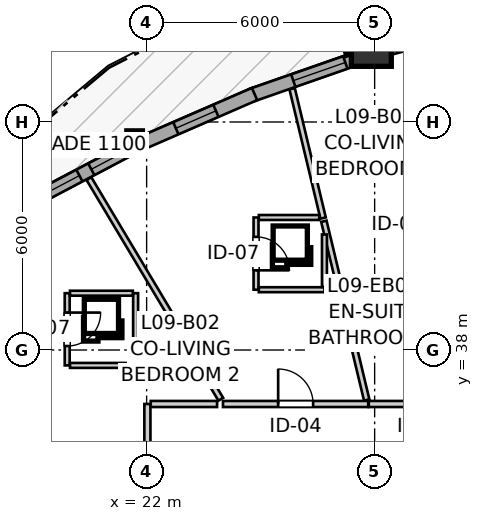
"""IFC4 building model, lengths in metres.
Left out: names, types, materials, properties, quantities, classifications, styles, units other than length and angle.
Written with IfcOpenShell. Run it as: python <this file> out.ifc"""

import sys

from ifc_helpers import new_model, si_unit, direction, frame, frame_2d, origin, origin_2d, place, context, subcontext, project, spatial, rectangle, i_section, extrude, source, transform, mapped, element, fill, save


model = new_model("IFC4")
c1 = context("Model", 3, precision=1e-05, world=origin(), true_north=direction((0.0, 1.0)))
c2 = subcontext(c1, "Body", "Model", "MODEL_VIEW")
j1 = project(units=[si_unit("LENGTHUNIT", "METRE"), si_unit("PLANEANGLEUNIT", "RADIAN")], contexts=[c1])
p1 = place(None, origin())
s1 = spatial("IfcSite", under=j1, at=p1, CompositionType="ELEMENT")
p2 = place(p1, origin())
s2 = spatial("IfcBuilding", under=s1, at=p2, CompositionType="ELEMENT")
p3 = place(p2, frame((0.0, 0.0, 33.4)))
s3 = spatial("IfcBuildingStorey", under=s2, at=p3, CompositionType="ELEMENT", Elevation=33.4)
m1 = source(origin(), c2, "Body", "SweptSolid", [
    extrude(rectangle(XDim=1.05, YDim=1.05, at=origin_2d()), origin(), (0.0, 0.0, 1.0), 2.94),
])
p4 = place(p3, frame((27.913, 45.99, 0.0), z_axis=(0.0, 0.0, 1.0), x_axis=(1.0, 0.0, 0.0)))
e1 = element("IfcColumn", 1, at=p4, inside=s3, PredefinedType="COLUMN", context=c2, shape_type="MappedRepresentation", body=[
    mapped(m1, transform((0.0, 0.0, 0.0), x_axis=(1.0, 0.0, 0.0), y_axis=(0.0, 1.0, 0.0), z_axis=(0.0, 0.0, 1.0), scale=1.0)),
])
m2 = source(origin(), c2, "Body", "SweptSolid", [
    extrude(i_section(OverallWidth=0.409, OverallDepth=0.425, WebThickness=0.03, FlangeThickness=0.048, FilletRadius=0.015, at=origin_2d()), origin(), (0.0, 0.0, 1.0), 2.94),
])
p5 = place(p3, frame((21.683, 43.554, 0.0), z_axis=(0.0, 0.0, 1.0), x_axis=(1.0, 0.0, 0.0)))
e2 = element("IfcColumn", 2, at=p5, inside=s3, PredefinedType="PILASTER", context=c2, shape_type="MappedRepresentation", body=[
    mapped(m2, transform((0.0, 0.0, 0.0), x_axis=(1.0, 0.0, 0.0), y_axis=(0.0, 1.0, 0.0), z_axis=(0.0, 0.0, 1.0), scale=1.0)),
])
p6 = place(p3, frame((31.298, 46.722, 0.0), z_axis=(0.0, 0.0, 1.0), x_axis=(-0.965455913242, -0.260566459057, 0.0)))
e3 = element("IfcWall", 3, at=p6, inside=s3, PredefinedType="SOLIDWALL", context=c2, shape_type="SweptSolid", body=[
    extrude(rectangle(XDim=3.159, YDim=0.35, at=frame_2d((1.58, 0.0))), origin(), (0.0, 0.0, 1.0), 2.42),
])
p7 = place(p6, frame((1.08, 0.0, 0.0)))
e4 = element("IfcOpeningElement", 4, at=p7, cuts=e3, PredefinedType="OPENING", context=c2, shape_type="SweptSolid", body=[
    extrude(rectangle(XDim=1.0, YDim=2.1, at=frame_2d((0.5, 1.05))), frame((0.0, 0.185, 0.0), z_axis=(0.0, -1.0, 0.0), x_axis=(1.0, 0.0, 0.0)), (0.0, 0.0, 1.0), 0.37),
])
p8 = place(p3, frame((27.687, 45.726, 0.0), z_axis=(0.0, 0.0, 1.0), x_axis=(-0.9441205041, -0.329600475936, 0.0)))
e5 = element("IfcWall", 5, at=p8, inside=s3, PredefinedType="SOLIDWALL", context=c2, shape_type="SweptSolid", body=[
    extrude(rectangle(XDim=3.104, YDim=0.35, at=frame_2d((1.552, 0.0))), origin(), (0.0, 0.0, 1.0), 2.42),
])
p9 = place(p8, frame((0.486, 0.0, 0.82)))
e6 = element("IfcOpeningElement", 6, at=p9, cuts=e5, PredefinedType="OPENING", context=c2, shape_type="SweptSolid", body=[
    extrude(rectangle(XDim=1.45, YDim=1.25, at=frame_2d((0.725, 0.625))), frame((0.0, 0.185, 0.0), z_axis=(0.0, -1.0, 0.0), x_axis=(1.0, 0.0, 0.0)), (0.0, 0.0, 1.0), 0.37),
])
p10 = place(p3, frame((24.84, 44.735, 0.0), z_axis=(0.0, 0.0, 1.0), x_axis=(-0.917090935142, -0.398678086532, 0.0)))
e7 = element("IfcWall", 7, at=p10, inside=s3, PredefinedType="SOLIDWALL", context=c2, shape_type="SweptSolid", body=[
    extrude(rectangle(XDim=3.346, YDim=0.35, at=frame_2d((1.673, 0.0))), origin(), (0.0, 0.0, 1.0), 2.42),
])
p11 = place(p10, frame((1.108, 0.0, 0.82)))
e8 = element("IfcOpeningElement", 8, at=p11, cuts=e7, PredefinedType="OPENING", context=c2, shape_type="SweptSolid", body=[
    extrude(rectangle(XDim=1.15, YDim=1.2, at=frame_2d((0.575, 0.6))), frame((0.0, 0.185, 0.0), z_axis=(0.0, -1.0, 0.0), x_axis=(1.0, 0.0, 0.0)), (0.0, 0.0, 1.0), 0.37),
])
p12 = place(p3, frame((21.747, 43.39, 0.0), z_axis=(0.0, 0.0, 1.0), x_axis=(-0.88437802144, -0.46677137358, 0.0)))
e9 = element("IfcWall", 9, at=p12, inside=s3, PredefinedType="SOLIDWALL", context=c2, shape_type="SweptSolid", body=[
    extrude(rectangle(XDim=3.327, YDim=0.35, at=frame_2d((1.664, 0.0))), origin(), (0.0, 0.0, 1.0), 2.42),
])
p13 = place(p12, frame((0.311, 0.0, 0.82)))
e10 = element("IfcOpeningElement", 10, at=p13, cuts=e9, PredefinedType="OPENING", context=c2, shape_type="SweptSolid", body=[
    extrude(rectangle(XDim=1.05, YDim=1.45, at=frame_2d((0.525, 0.725))), frame((0.0, 0.185, 0.0), z_axis=(0.0, -1.0, 0.0), x_axis=(1.0, 0.0, 0.0)), (0.0, 0.0, 1.0), 0.37),
])
p14 = place(p12, frame((1.714, 0.0, 0.82)))
e11 = element("IfcOpeningElement", 11, at=p14, cuts=e9, PredefinedType="OPENING", context=c2, shape_type="SweptSolid", body=[
    extrude(rectangle(XDim=1.35, YDim=1.45, at=frame_2d((0.675, 0.725))), frame((0.0, 0.185, 0.0), z_axis=(0.0, -1.0, 0.0), x_axis=(1.0, 0.0, 0.0)), (0.0, 0.0, 1.0), 0.37),
])
p15 = place(p3, frame((22.02, 32.71, 0.0), z_axis=(0.0, 0.0, 1.0), x_axis=(0.0, 1.0, 0.0)))
e12 = element("IfcWall", 12, at=p15, inside=s3, PredefinedType="PARTITIONING", context=c2, shape_type="SweptSolid", body=[
    extrude(rectangle(XDim=3.87, YDim=0.16, at=frame_2d((1.935, 0.0))), origin(), (0.0, 0.0, 1.0), 2.94),
])
p16 = place(p15, frame((1.485, 0.0, 0.0)))
e13 = element("IfcOpeningElement", 13, at=p16, cuts=e12, PredefinedType="OPENING", context=c2, shape_type="SweptSolid", body=[
    extrude(rectangle(XDim=0.92, YDim=2.1, at=frame_2d((0.46, 1.05))), frame((0.0, 0.09, 0.0), z_axis=(0.0, -1.0, 0.0), x_axis=(1.0, 0.0, 0.0)), (0.0, 0.0, 1.0), 0.18),
])
p17 = place(p3, frame((24.009, 36.58, 0.0), z_axis=(0.0, 0.0, 1.0), x_axis=(1.0, 0.0, 0.0)))
e14 = element("IfcWall", 14, at=p17, inside=s3, PredefinedType="PARTITIONING", context=c2, shape_type="SweptSolid", body=[
    extrude(rectangle(XDim=3.822, YDim=0.16, at=frame_2d((1.911, 0.0))), origin(), (0.0, 0.0, 1.0), 2.548),
])
p18 = place(p17, frame((1.452, 0.0, 0.0)))
e15 = element("IfcOpeningElement", 15, at=p18, cuts=e14, PredefinedType="OPENING", context=c2, shape_type="SweptSolid", body=[
    extrude(rectangle(XDim=0.92, YDim=2.1, at=frame_2d((0.46, 1.05))), frame((0.0, 0.09, 0.0), z_axis=(0.0, -1.0, 0.0), x_axis=(1.0, 0.0, 0.0)), (0.0, 0.0, 1.0), 0.18),
])
p19 = place(p3, frame((27.846, 36.58, 0.0), z_axis=(0.0, 0.0, 1.0), x_axis=(1.0, 0.0, 0.0)))
e16 = element("IfcWall", 16, at=p19, inside=s3, PredefinedType="PARTITIONING", context=c2, shape_type="SweptSolid", body=[
    extrude(rectangle(XDim=2.903, YDim=0.16, at=frame_2d((1.452, 0.0))), origin(), (0.0, 0.0, 1.0), 2.94),
])
p20 = place(p19, frame((0.969, 0.0, 0.0)))
e17 = element("IfcOpeningElement", 17, at=p20, cuts=e16, PredefinedType="OPENING", context=c2, shape_type="SweptSolid", body=[
    extrude(rectangle(XDim=0.92, YDim=2.1, at=frame_2d((0.46, 1.05))), frame((0.0, 0.09, 0.0), z_axis=(0.0, -1.0, 0.0), x_axis=(1.0, 0.0, 0.0)), (0.0, 0.0, 1.0), 0.18),
])
p21 = place(p3, frame((24.879, 41.487, 0.0), z_axis=(0.0, 0.0, 1.0), x_axis=(0.0, -1.0, 0.0)))
e18 = element("IfcWall", 18, at=p21, inside=s3, PredefinedType="PARTITIONING", context=c2, shape_type="SweptSolid", body=[
    extrude(rectangle(XDim=1.9, YDim=0.13, at=frame_2d((0.95, 0.0))), origin(), (0.0, 0.0, 1.0), 2.94),
])
p22 = place(p21, frame((0.51, 0.0, 0.0)))
e19 = element("IfcOpeningElement", 19, at=p22, cuts=e18, PredefinedType="OPENING", context=c2, shape_type="SweptSolid", body=[
    extrude(rectangle(XDim=0.88, YDim=2.05, at=frame_2d((0.44, 1.025))), frame((0.0, 0.075, 0.0), z_axis=(0.0, -1.0, 0.0), x_axis=(1.0, 0.0, 0.0)), (0.0, 0.0, 1.0), 0.15),
])
p23 = place(p3, frame((19.91, 39.495, 0.0), z_axis=(0.0, 0.0, 1.0), x_axis=(0.0, -1.0, 0.0)))
e20 = element("IfcWall", 20, at=p23, inside=s3, PredefinedType="PARTITIONING", context=c2, shape_type="SweptSolid", body=[
    extrude(rectangle(XDim=1.9, YDim=0.13, at=frame_2d((0.95, 0.0))), origin(), (0.0, 0.0, 1.0), 2.94),
])
p24 = place(p23, frame((0.51, 0.0, 0.0)))
e21 = element("IfcOpeningElement", 21, at=p24, cuts=e20, PredefinedType="OPENING", context=c2, shape_type="SweptSolid", body=[
    extrude(rectangle(XDim=0.88, YDim=2.05, at=frame_2d((0.44, 1.025))), frame((0.0, 0.075, 0.0), z_axis=(0.0, -1.0, 0.0), x_axis=(1.0, 0.0, 0.0)), (0.0, 0.0, 1.0), 0.15),
])
p25 = place(p3, frame((11.92, 36.618, 0.0), z_axis=(0.0, 0.0, 1.0), x_axis=(0.866473494239, -0.499223080177, 0.0)))
e22 = element("IfcWall", 22, at=p25, inside=s3, PredefinedType="PARTITIONING", context=c2, shape_type="SweptSolid", body=[
    extrude(rectangle(XDim=11.514, YDim=0.145, at=frame_2d((5.757, 0.0))), origin(), (0.0, 0.0, 1.0), 2.94),
])
p26 = place(p3, frame((14.566, 38.751, 0.0), z_axis=(0.0, 0.0, 1.0), x_axis=(0.777881688073, -0.628410756879, 0.0)))
e23 = element("IfcWall", 23, at=p26, inside=s3, PredefinedType="PARTITIONING", context=c2, shape_type="SweptSolid", body=[
    extrude(rectangle(XDim=9.413, YDim=0.145, at=frame_2d((4.707, 0.0))), origin(), (0.0, 0.0, 1.0), 2.94),
])
p27 = place(p3, frame((20.481, 42.51, 0.0), z_axis=(0.0, 0.0, 1.0), x_axis=(0.513067331262, -0.858348363773, 0.0)))
e24 = element("IfcWall", 24, at=p27, inside=s3, PredefinedType="PARTITIONING", context=c2, shape_type="SweptSolid", body=[
    extrude(rectangle(XDim=6.765, YDim=0.145, at=frame_2d((3.382, 0.0))), origin(), (0.0, 0.0, 1.0), 2.94),
])
p28 = place(p3, frame((26.664, 41.388, 0.0), z_axis=(0.0, 0.0, 1.0), x_axis=(0.233021630241, -0.972471552201, 0.0)))
e25 = element("IfcWall", 25, at=p28, inside=s3, PredefinedType="PARTITIONING", context=c2, shape_type="SweptSolid", body=[
    extrude(rectangle(XDim=4.836, YDim=0.145, at=frame_2d((2.418, 0.0))), origin(), (0.0, 0.0, 1.0), 2.94),
])
p29 = place(p3, frame((25.829, 44.875, 0.0), z_axis=(0.0, 0.0, 1.0), x_axis=(0.232921769711, -0.972495475154, 0.0)))
e26 = element("IfcWall", 26, at=p29, inside=s3, PredefinedType="PARTITIONING", context=c2, shape_type="SweptSolid", body=[
    extrude(rectangle(XDim=3.5, YDim=0.145, at=frame_2d((1.75, 0.0))), origin(), (0.0, 0.0, 1.0), 2.94),
])
p30 = place(p3, frame((22.108, 36.58, 0.0), z_axis=(0.0, 0.0, 1.0), x_axis=(1.0, 0.0, 0.0)))
e27 = element("IfcWall", 27, at=p30, inside=s3, PredefinedType="PARTITIONING", context=c2, shape_type="SweptSolid", body=[
    extrude(rectangle(XDim=1.746, YDim=0.16, at=frame_2d((0.873, 0.0))), origin(), (0.0, 0.0, 1.0), 2.548),
])
p31 = place(p3, frame((21.71, 37.595, 0.0), z_axis=(0.0, 0.0, 1.0), x_axis=(0.0, 1.0, 0.0)))
e28 = element("IfcWall", 28, at=p31, inside=s3, PredefinedType="PARTITIONING", context=c2, shape_type="SweptSolid", body=[
    extrude(rectangle(XDim=1.9, YDim=0.13, at=frame_2d((0.95, 0.0))), origin(), (0.0, 0.0, 1.0), 2.94),
])
for number, where, z_axis, x_axis in (
    (29, (19.983, 39.495, 0.0), (0.0, 0.0, 1.0), (1.0, 0.0, 0.0)),
    (30, (19.983, 37.595, 0.0), (0.0, 0.0, 1.0), (1.0, 0.0, 0.0)),
):
    element("IfcWall", number, at=place(p3, frame(where, z_axis=z_axis, x_axis=x_axis)), inside=s3, PredefinedType="PARTITIONING", context=c2, shape_type="SweptSolid", body=[
        extrude(rectangle(XDim=1.654, YDim=0.13, at=frame_2d((0.827, 0.0))), origin(), (0.0, 0.0, 1.0), 2.94),
    ])
p32 = place(p3, frame((24.952, 39.587, 0.0), z_axis=(0.0, 0.0, 1.0), x_axis=(1.0, 0.0, 0.0)))
e31 = element("IfcWall", 31, at=p32, inside=s3, PredefinedType="PARTITIONING", context=c2, shape_type="SweptSolid", body=[
    extrude(rectangle(XDim=1.727, YDim=0.13, at=frame_2d((0.864, 0.0))), origin(), (0.0, 0.0, 1.0), 2.94),
])
p33 = place(p3, frame((24.952, 41.487, 0.0), z_axis=(0.0, 0.0, 1.0), x_axis=(1.0, 0.0, 0.0)))
e32 = element("IfcWall", 32, at=p33, inside=s3, PredefinedType="PARTITIONING", context=c2, shape_type="SweptSolid", body=[
    extrude(rectangle(XDim=1.59, YDim=0.13, at=frame_2d((0.795, 0.0))), origin(), (0.0, 0.0, 1.0), 2.508),
])
p34 = place(p3, frame((26.679, 39.66, 0.0), z_axis=(0.0, 0.0, 1.0), x_axis=(0.0, 1.0, 0.0)))
e33 = element("IfcWall", 33, at=p34, inside=s3, PredefinedType="PARTITIONING", context=c2, shape_type="SweptSolid", body=[
    extrude(rectangle(XDim=1.38, YDim=0.13, at=frame_2d((0.69, 0.0))), origin(), (0.0, 0.0, 1.0), 2.94),
])
m3 = source(origin(), c2, "Body", "SweptSolid", [
    extrude(rectangle(XDim=1.45, YDim=1.25, at=frame_2d((0.725, 0.625))), frame((0.0, 0.03, 0.0), z_axis=(0.0, -1.0, 0.0), x_axis=(1.0, 0.0, 0.0)), (0.0, 0.0, 1.0), 0.06),
])
p35 = place(p9, origin())
e34 = element("IfcWindow", 34, at=p35, inside=s3, PartitioningType="SINGLE_PANEL", PredefinedType="WINDOW", context=c2, shape_type="MappedRepresentation", body=[
    mapped(m3, transform((0.0, 0.0, 0.0), x_axis=(1.0, 0.0, 0.0), y_axis=(0.0, 1.0, 0.0), z_axis=(0.0, 0.0, 1.0), scale=1.0)),
])
fill(e6, e34)
m4 = source(origin(), c2, "Body", "SweptSolid", [
    extrude(rectangle(XDim=1.15, YDim=1.2, at=frame_2d((0.575, 0.6))), frame((0.0, 0.03, 0.0), z_axis=(0.0, -1.0, 0.0), x_axis=(1.0, 0.0, 0.0)), (0.0, 0.0, 1.0), 0.06),
])
p36 = place(p11, origin())
e35 = element("IfcWindow", 35, at=p36, inside=s3, PartitioningType="SINGLE_PANEL", PredefinedType="WINDOW", context=c2, shape_type="MappedRepresentation", body=[
    mapped(m4, transform((0.0, 0.0, 0.0), x_axis=(1.0, 0.0, 0.0), y_axis=(0.0, 1.0, 0.0), z_axis=(0.0, 0.0, 1.0), scale=1.0)),
])
fill(e8, e35)
m5 = source(origin(), c2, "Body", "SweptSolid", [
    extrude(rectangle(XDim=1.05, YDim=1.45, at=frame_2d((0.525, 0.725))), frame((0.0, 0.03, 0.0), z_axis=(0.0, -1.0, 0.0), x_axis=(1.0, 0.0, 0.0)), (0.0, 0.0, 1.0), 0.06),
])
p37 = place(p13, origin())
e36 = element("IfcWindow", 36, at=p37, inside=s3, PartitioningType="SINGLE_PANEL", PredefinedType="WINDOW", context=c2, shape_type="MappedRepresentation", body=[
    mapped(m5, transform((0.0, 0.0, 0.0), x_axis=(1.0, 0.0, 0.0), y_axis=(0.0, 1.0, 0.0), z_axis=(0.0, 0.0, 1.0), scale=1.0)),
])
fill(e10, e36)
m6 = source(origin(), c2, "Body", "SweptSolid", [
    extrude(rectangle(XDim=1.35, YDim=1.45, at=frame_2d((0.675, 0.725))), frame((0.0, 0.03, 0.0), z_axis=(0.0, -1.0, 0.0), x_axis=(1.0, 0.0, 0.0)), (0.0, 0.0, 1.0), 0.06),
])
p38 = place(p14, origin())
e37 = element("IfcWindow", 37, at=p38, inside=s3, PartitioningType="SINGLE_PANEL", PredefinedType="WINDOW", context=c2, shape_type="MappedRepresentation", body=[
    mapped(m6, transform((0.0, 0.0, 0.0), x_axis=(1.0, 0.0, 0.0), y_axis=(0.0, 1.0, 0.0), z_axis=(0.0, 0.0, 1.0), scale=1.0)),
])
fill(e11, e37)
m7 = source(origin(), c2, "Body", "SweptSolid", [
    extrude(rectangle(XDim=0.92, YDim=2.1, at=frame_2d((0.46, 1.05))), frame((0.0, 0.025, 0.0), z_axis=(0.0, -1.0, 0.0), x_axis=(1.0, 0.0, 0.0)), (0.0, 0.0, 1.0), 0.05),
])
p39 = place(p18, origin())
e38 = element("IfcDoor", 38, at=p39, inside=s3, OperationType="SINGLE_SWING_LEFT", PredefinedType="DOOR", context=c2, shape_type="MappedRepresentation", body=[
    mapped(m7, transform((0.0, 0.0, 0.0), x_axis=(1.0, 0.0, 0.0), y_axis=(0.0, 1.0, 0.0), z_axis=(0.0, 0.0, 1.0), scale=1.0)),
])
fill(e15, e38)
m8 = source(origin(), c2, "Body", "SweptSolid", [
    extrude(rectangle(XDim=0.88, YDim=2.05, at=frame_2d((0.44, 1.025))), frame((0.0, 0.025, 0.0), z_axis=(0.0, -1.0, 0.0), x_axis=(1.0, 0.0, 0.0)), (0.0, 0.0, 1.0), 0.05),
])
p40 = place(p22, origin())
e39 = element("IfcDoor", 39, at=p40, inside=s3, OperationType="SINGLE_SWING_RIGHT", PredefinedType="DOOR", context=c2, shape_type="MappedRepresentation", body=[
    mapped(m8, transform((0.0, 0.0, 0.0), x_axis=(1.0, 0.0, 0.0), y_axis=(0.0, 1.0, 0.0), z_axis=(0.0, 0.0, 1.0), scale=1.0)),
])
fill(e19, e39)
p41 = place(p24, origin())
e40 = element("IfcDoor", 40, at=p41, inside=s3, OperationType="SINGLE_SWING_LEFT", PredefinedType="DOOR", context=c2, shape_type="MappedRepresentation", body=[
    mapped(m8, transform((0.0, 0.0, 0.0), x_axis=(1.0, 0.0, 0.0), y_axis=(0.0, 1.0, 0.0), z_axis=(0.0, 0.0, 1.0), scale=1.0)),
])
fill(e21, e40)
save(model, sys.argv[1])
